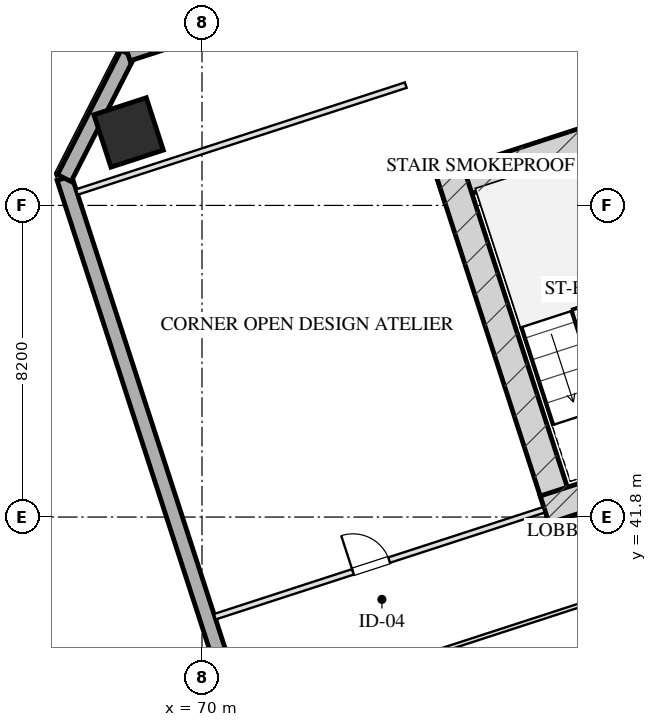
"""IFC4 building model, lengths in metres.
Left out: names, types, materials, properties, quantities, classifications, styles, units other than length and angle.
Written with IfcOpenShell. Run it as: python <this file> out.ifc"""

import sys

from ifc_helpers import new_model, si_unit, direction, frame, frame_2d, origin, origin_2d, place, context, subcontext, project, spatial, rectangle, hollow_rectangle, extrude, element, fill, save


model = new_model("IFC4")
c1 = context("Model", 3, precision=1e-05, world=origin(), true_north=direction((0.0, 1.0)))
c2 = subcontext(c1, "Body", "Model", "MODEL_VIEW")
j1 = project(units=[si_unit("LENGTHUNIT", "METRE"), si_unit("PLANEANGLEUNIT", "RADIAN")], contexts=[c1])
p1 = place(None, origin())
s1 = spatial("IfcSite", under=j1, at=p1, CompositionType="ELEMENT")
p2 = place(p1, origin())
s2 = spatial("IfcBuilding", under=s1, at=p2, CompositionType="ELEMENT")
p3 = place(p2, frame((0.0, 0.0, 81.65)))
s3 = spatial("IfcBuildingStorey", under=s2, at=p3, CompositionType="ELEMENT", Elevation=81.65)
p4 = place(p3, frame((76.272, 50.443, 0.0), z_axis=(0.0, 0.0, 1.0), x_axis=(0.951056072937, 0.309018358888, 0.0)))
e1 = element("IfcWall", 1, at=p4, inside=s3, PredefinedType="SHEAR", context=c2, shape_type="SweptSolid", body=[
    extrude(rectangle(XDim=16.55, YDim=0.75, at=frame_2d((8.275, 0.0))), origin(), (0.0, 0.0, 1.0), 3.45),
])
p5 = place(p3, frame((79.489, 41.756, 0.0), z_axis=(0.0, 0.0, 1.0), x_axis=(-0.309016134813, 0.951056795583, 0.0)))
e2 = element("IfcWall", 2, at=p5, inside=s3, PredefinedType="SHEAR", context=c2, shape_type="SweptSolid", body=[
    extrude(rectangle(XDim=9.63, YDim=0.75, at=frame_2d((4.815, 0.0))), origin(), (0.0, 0.0, 1.0), 3.45),
])
p6 = place(p3, frame((79.016, 41.997, 0.0), z_axis=(0.0, 0.0, 1.0), x_axis=(0.95106038264, 0.309005094736, 0.0)))
e3 = element("IfcWall", 3, at=p6, inside=s3, PredefinedType="SHEAR", context=c2, shape_type="SweptSolid", body=[
    extrude(rectangle(XDim=4.295, YDim=0.75, at=frame_2d((2.147, 0.0))), origin(), (0.0, 0.0, 1.0), 3.45),
])
p7 = place(p3, frame((68.069, 51.92, 0.0), z_axis=(0.0, 0.0, 1.0), x_axis=(0.951056516295, 0.309016994375, 0.0)))
e4 = element("IfcColumn", 4, at=p7, inside=s3, PredefinedType="COLUMN", context=c2, shape_type="SweptSolid", body=[
    extrude(hollow_rectangle(XDim=1.45, YDim=1.45, WallThickness=0.05, at=origin_2d()), origin(), (0.0, 0.0, 1.0), 3.451),
])
p8 = place(p3, frame((80.716, 6.59, 0.0), z_axis=(0.0, 0.0, 1.0), x_axis=(-0.309017542002, 0.95105633836, 0.0)))
e5 = element("IfcWall", 5, at=p8, inside=s3, PredefinedType="SOLIDWALL", context=c2, shape_type="SweptSolid", body=[
    extrude(rectangle(XDim=46.4, YDim=0.4, at=frame_2d((23.2, 0.0))), origin(), (0.0, 0.0, 1.0), 2.61),
])
p9 = place(p8, frame((24.6, 0.0, 0.75)))
e6 = element("IfcOpeningElement", 6, at=p9, cuts=e5, PredefinedType="OPENING", context=c2, shape_type="SweptSolid", body=[
    extrude(rectangle(XDim=2.4, YDim=1.46, at=frame_2d((1.2, 0.73))), frame((0.0, 0.21, 0.0), z_axis=(0.0, -1.0, 0.0), x_axis=(1.0, 0.0, 0.0)), (0.0, 0.0, 1.0), 0.42),
])
p10 = place(p8, frame((28.4, 0.0, 0.75)))
e7 = element("IfcOpeningElement", 7, at=p10, cuts=e5, PredefinedType="OPENING", context=c2, shape_type="SweptSolid", body=[
    extrude(rectangle(XDim=2.4, YDim=1.46, at=frame_2d((1.2, 0.73))), frame((0.0, 0.21, 0.0), z_axis=(0.0, -1.0, 0.0), x_axis=(1.0, 0.0, 0.0)), (0.0, 0.0, 1.0), 0.42),
])
p11 = place(p8, frame((18.25, 0.0, 0.0)))
e8 = element("IfcOpeningElement", 8, at=p11, cuts=e5, PredefinedType="OPENING", context=c2, shape_type="SweptSolid", body=[
    extrude(rectangle(XDim=1.1, YDim=2.15, at=frame_2d((0.55, 1.075))), frame((0.0, 0.21, 0.0), z_axis=(0.0, -1.0, 0.0), x_axis=(1.0, 0.0, 0.0)), (0.0, 0.0, 1.0), 0.42),
])
p12 = place(p3, frame((66.377, 50.719, 0.0), z_axis=(0.0, 0.0, 1.0), x_axis=(0.454026238093, 0.890988313685, 0.0)))
e9 = element("IfcWall", 9, at=p12, inside=s3, PredefinedType="SOLIDWALL", context=c2, shape_type="SweptSolid", body=[
    extrude(rectangle(XDim=3.677, YDim=0.4, at=frame_2d((1.838, 0.0))), origin(), (0.0, 0.0, 1.0), 2.61),
])
p13 = place(p3, frame((68.047, 53.995, 0.0), z_axis=(0.0, 0.0, 1.0), x_axis=(0.95105505922, 0.309021478754, 0.0)))
e10 = element("IfcWall", 10, at=p13, inside=s3, PredefinedType="SOLIDWALL", context=c2, shape_type="SweptSolid", body=[
    extrude(rectangle(XDim=29.4, YDim=0.4, at=frame_2d((14.7, 0.0))), origin(), (0.0, 0.0, 1.0), 2.61),
])
p14 = place(p3, frame((66.707, 50.352, 0.0), z_axis=(0.0, 0.0, 1.0), x_axis=(0.951057133767, 0.309015093986, 0.0)))
e11 = element("IfcWall", 11, at=p14, inside=s3, PredefinedType="PARTITIONING", context=c2, shape_type="SweptSolid", body=[
    extrude(rectangle(XDim=9.1, YDim=0.15, at=frame_2d((4.55, 0.0))), origin(), (0.0, 0.0, 1.0), 3.175),
])
p15 = place(p3, frame((70.338, 39.177, 0.0), z_axis=(0.0, 0.0, 1.0), x_axis=(0.951059695568, 0.309007209409, 0.0)))
e12 = element("IfcWall", 12, at=p15, inside=s3, PredefinedType="PARTITIONING", context=c2, shape_type="SweptSolid", body=[
    extrude(rectangle(XDim=9.1, YDim=0.15, at=frame_2d((4.55, 0.0))), origin(), (0.0, 0.0, 1.0), 3.175),
])
p16 = place(p15, frame((3.822, 0.0, 0.0)))
e13 = element("IfcOpeningElement", 13, at=p16, cuts=e12, PredefinedType="OPENING", context=c2, shape_type="SweptSolid", body=[
    extrude(rectangle(XDim=1.0, YDim=2.05, at=frame_2d((0.5, 1.025))), frame((0.0, 0.085, 0.0), z_axis=(0.0, -1.0, 0.0), x_axis=(1.0, 0.0, 0.0)), (0.0, 0.0, 1.0), 0.17),
])
p17 = place(p3, frame((71.166, 36.629, 0.0), z_axis=(0.0, 0.0, 1.0), x_axis=(0.951058653673, 0.309010416124, 0.0)))
e14 = element("IfcWall", 14, at=p17, inside=s3, PredefinedType="MOVABLE", context=c2, shape_type="SweptSolid", body=[
    extrude(rectangle(XDim=11.675, YDim=0.1, at=frame_2d((5.837, 0.0))), origin(), (0.0, 0.0, 1.0), 3.175),
])
p18 = place(p16, origin())
e15 = element("IfcDoor", 15, at=p18, inside=s3, OperationType="SINGLE_SWING_LEFT", PredefinedType="DOOR", context=c2, shape_type="SweptSolid", body=[
    extrude(rectangle(XDim=1.0, YDim=2.05, at=frame_2d((0.5, 1.025))), frame((0.0, 0.025, 0.0), z_axis=(0.0, -1.0, 0.0), x_axis=(1.0, 0.0, 0.0)), (0.0, 0.0, 1.0), 0.05),
])
fill(e13, e15)
save(model, sys.argv[1])
